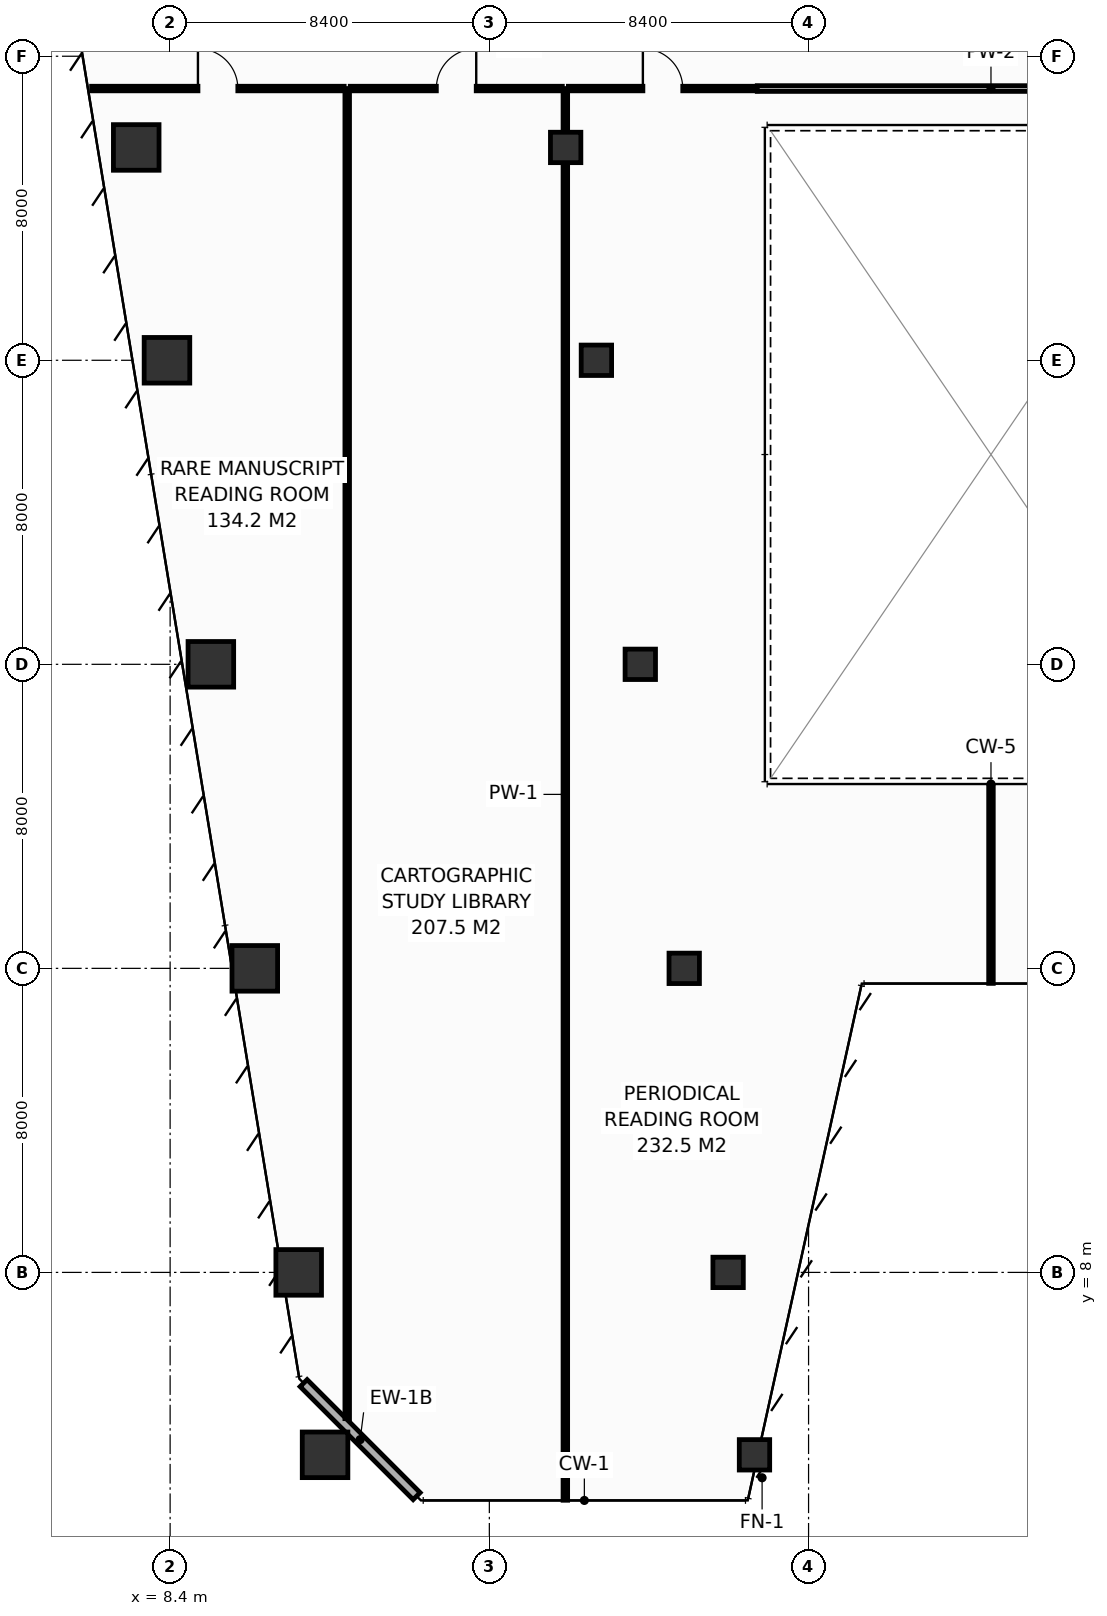
"""IFC4 building model, lengths in metres.
Left out: names, types, materials, properties, quantities, classifications, styles, units other than length and angle.
Written with IfcOpenShell. Run it as: python <this file> out.ifc"""

import sys

from ifc_helpers import new_model, si_unit, direction, frame, frame_2d, origin, origin_2d, place, context, subcontext, project, spatial, rectangle, hollow_rectangle, extrude, element, fill, save


model = new_model("IFC4")
c1 = context("Model", 3, precision=1e-05, world=origin(), true_north=direction((0.0, 1.0)))
c2 = subcontext(c1, "Body", "Model", "MODEL_VIEW")
j1 = project(units=[si_unit("LENGTHUNIT", "METRE"), si_unit("PLANEANGLEUNIT", "RADIAN")], contexts=[c1])
p1 = place(None, origin())
s1 = spatial("IfcSite", under=j1, at=p1, CompositionType="ELEMENT")
p2 = place(p1, origin())
s2 = spatial("IfcBuilding", under=s1, at=p2, CompositionType="ELEMENT")
p3 = place(p2, frame((0.0, 0.0, 47.2)))
s3 = spatial("IfcBuildingStorey", under=s2, at=p3, CompositionType="ELEMENT", Elevation=47.2)
p4 = place(p3, frame((12.477, 3.2, 0.0), z_axis=(0.0, 0.0, 1.0), x_axis=(1.0, 0.0, 0.0)))
e1 = element("IfcColumn", 1, at=p4, inside=s3, PredefinedType="COLUMN", context=c2, shape_type="SweptSolid", body=[
    extrude(hollow_rectangle(XDim=1.2, YDim=1.2, WallThickness=0.055, at=origin_2d()), origin(), (0.0, 0.0, 1.0), 4.4),
])
p5 = place(p3, frame((23.777, 3.2, 0.0), z_axis=(0.0, 0.0, 1.0), x_axis=(1.0, 0.0, 0.0)))
e2 = element("IfcColumn", 2, at=p5, inside=s3, PredefinedType="COLUMN", context=c2, shape_type="SweptSolid", body=[
    extrude(hollow_rectangle(XDim=0.8, YDim=0.8, WallThickness=0.036, at=origin_2d()), origin(), (0.0, 0.0, 1.0), 4.4),
])
p6 = place(p3, frame((11.783, 8.0, 0.0), z_axis=(0.0, 0.0, 1.0), x_axis=(1.0, 0.0, 0.0)))
e3 = element("IfcColumn", 3, at=p6, inside=s3, PredefinedType="COLUMN", context=c2, shape_type="SweptSolid", body=[
    extrude(hollow_rectangle(XDim=1.2, YDim=1.2, WallThickness=0.055, at=origin_2d()), origin(), (0.0, 0.0, 1.0), 4.4),
])
p7 = place(p3, frame((23.083, 8.0, 0.0), z_axis=(0.0, 0.0, 1.0), x_axis=(1.0, 0.0, 0.0)))
e4 = element("IfcColumn", 4, at=p7, inside=s3, PredefinedType="COLUMN", context=c2, shape_type="SweptSolid", body=[
    extrude(hollow_rectangle(XDim=0.8, YDim=0.8, WallThickness=0.036, at=origin_2d()), origin(), (0.0, 0.0, 1.0), 4.4),
])
p8 = place(p3, frame((10.628, 16.0, 0.0), z_axis=(0.0, 0.0, 1.0), x_axis=(1.0, 0.0, 0.0)))
e5 = element("IfcColumn", 5, at=p8, inside=s3, PredefinedType="COLUMN", context=c2, shape_type="SweptSolid", body=[
    extrude(hollow_rectangle(XDim=1.2, YDim=1.2, WallThickness=0.055, at=origin_2d()), origin(), (0.0, 0.0, 1.0), 4.4),
])
p9 = place(p3, frame((21.928, 16.0, 0.0), z_axis=(0.0, 0.0, 1.0), x_axis=(1.0, 0.0, 0.0)))
e6 = element("IfcColumn", 6, at=p9, inside=s3, PredefinedType="COLUMN", context=c2, shape_type="SweptSolid", body=[
    extrude(hollow_rectangle(XDim=0.8, YDim=0.8, WallThickness=0.036, at=origin_2d()), origin(), (0.0, 0.0, 1.0), 4.4),
])
p10 = place(p3, frame((9.472, 24.0, 0.0), z_axis=(0.0, 0.0, 1.0), x_axis=(1.0, 0.0, 0.0)))
e7 = element("IfcColumn", 7, at=p10, inside=s3, PredefinedType="COLUMN", context=c2, shape_type="SweptSolid", body=[
    extrude(hollow_rectangle(XDim=1.2, YDim=1.2, WallThickness=0.055, at=origin_2d()), origin(), (0.0, 0.0, 1.0), 4.4),
])
p11 = place(p3, frame((20.772, 24.0, 0.0), z_axis=(0.0, 0.0, 1.0), x_axis=(1.0, 0.0, 0.0)))
e8 = element("IfcColumn", 8, at=p11, inside=s3, PredefinedType="COLUMN", context=c2, shape_type="SweptSolid", body=[
    extrude(hollow_rectangle(XDim=0.8, YDim=0.8, WallThickness=0.036, at=origin_2d()), origin(), (0.0, 0.0, 1.0), 4.4),
])
p12 = place(p3, frame((8.317, 32.0, 0.0), z_axis=(0.0, 0.0, 1.0), x_axis=(1.0, 0.0, 0.0)))
e9 = element("IfcColumn", 9, at=p12, inside=s3, PredefinedType="COLUMN", context=c2, shape_type="SweptSolid", body=[
    extrude(hollow_rectangle(XDim=1.2, YDim=1.2, WallThickness=0.055, at=origin_2d()), origin(), (0.0, 0.0, 1.0), 4.4),
])
p13 = place(p3, frame((19.617, 32.0, 0.0), z_axis=(0.0, 0.0, 1.0), x_axis=(1.0, 0.0, 0.0)))
e10 = element("IfcColumn", 10, at=p13, inside=s3, PredefinedType="COLUMN", context=c2, shape_type="SweptSolid", body=[
    extrude(hollow_rectangle(XDim=0.8, YDim=0.8, WallThickness=0.036, at=origin_2d()), origin(), (0.0, 0.0, 1.0), 4.4),
])
p14 = place(p3, frame((7.508, 37.6, 0.0), z_axis=(0.0, 0.0, 1.0), x_axis=(1.0, 0.0, 0.0)))
e11 = element("IfcColumn", 11, at=p14, inside=s3, PredefinedType="COLUMN", context=c2, shape_type="SweptSolid", body=[
    extrude(hollow_rectangle(XDim=1.2, YDim=1.2, WallThickness=0.055, at=origin_2d()), origin(), (0.0, 0.0, 1.0), 4.4),
])
p15 = place(p3, frame((18.808, 37.6, 0.0), z_axis=(0.0, 0.0, 1.0), x_axis=(1.0, 0.0, 0.0)))
e12 = element("IfcColumn", 12, at=p15, inside=s3, PredefinedType="COLUMN", context=c2, shape_type="SweptSolid", body=[
    extrude(hollow_rectangle(XDim=0.8, YDim=0.8, WallThickness=0.036, at=origin_2d()), origin(), (0.0, 0.0, 1.0), 4.4),
])
p16 = place(p3, frame((11.913, 5.087, 0.0), z_axis=(0.0, 0.0, 1.0), x_axis=(0.707106781187, -0.707106781187, 0.0)))
e13 = element("IfcWall", 13, at=p16, inside=s3, PredefinedType="STANDARD", context=c2, shape_type="SweptSolid", body=[
    extrude(rectangle(XDim=4.206, YDim=0.26, at=frame_2d((2.103, 0.0))), origin(), (0.0, 0.0, 1.0), 4.15),
])
p17 = place(p3, frame((13.06, 4.152, 0.0), z_axis=(0.0, 0.0, 1.0), x_axis=(0.0, 1.0, 0.0)))
e14 = element("IfcWall", 14, at=p17, inside=s3, PredefinedType="PARTITIONING", context=c2, shape_type="SweptSolid", body=[
    extrude(rectangle(XDim=34.998, YDim=0.12, at=frame_2d((17.499, 0.0))), origin(), (0.0, 0.0, 1.0), 3.335),
])
p18 = place(p3, frame((18.8, 2.005, 0.0), z_axis=(0.0, 0.0, 1.0), x_axis=(0.0, 1.0, 0.0)))
e15 = element("IfcWall", 15, at=p18, inside=s3, PredefinedType="PARTITIONING", context=c2, shape_type="SweptSolid", body=[
    extrude(rectangle(XDim=37.145, YDim=0.12, at=frame_2d((18.573, 0.0))), origin(), (0.0, 0.0, 1.0), 3.335),
])
p19 = place(p3, frame((30.0, 15.605, 0.0), z_axis=(0.0, 0.0, 1.0), x_axis=(0.0, 1.0, 0.0)))
e16 = element("IfcWall", 16, at=p19, inside=s3, PredefinedType="PARTITIONING", context=c2, shape_type="SweptSolid", body=[
    extrude(rectangle(XDim=5.175, YDim=0.12, at=frame_2d((2.587, 0.0))), origin(), (0.0, 0.0, 1.0), 4.15),
])
p20 = place(p3, frame((6.334, 39.15, 0.0), z_axis=(0.0, 0.0, 1.0), x_axis=(1.0, 0.0, 0.0)))
e17 = element("IfcWall", 17, at=p20, inside=s3, PredefinedType="PARTITIONING", context=c2, shape_type="SweptSolid", body=[
    extrude(rectangle(XDim=6.646, YDim=0.12, at=frame_2d((3.323, 0.0))), origin(), (0.0, 0.0, 1.0), 3.635),
])
p21 = place(p20, frame((2.798, 0.0, 0.0)))
e18 = element("IfcOpeningElement", 18, at=p21, cuts=e17, PredefinedType="OPENING", context=c2, shape_type="SweptSolid", body=[
    extrude(rectangle(XDim=1.05, YDim=2.15, at=frame_2d((0.525, 1.075))), frame((0.0, 0.07, 0.0), z_axis=(0.0, -1.0, 0.0), x_axis=(1.0, 0.0, 0.0)), (0.0, 0.0, 1.0), 0.14),
])
p22 = place(p3, frame((13.14, 39.15, 0.0), z_axis=(0.0, 0.0, 1.0), x_axis=(1.0, 0.0, 0.0)))
e19 = element("IfcWall", 19, at=p22, inside=s3, PredefinedType="PARTITIONING", context=c2, shape_type="SweptSolid", body=[
    extrude(rectangle(XDim=5.58, YDim=0.12, at=frame_2d((2.79, 0.0))), origin(), (0.0, 0.0, 1.0), 4.15),
])
p23 = place(p22, frame((2.265, 0.0, 0.0)))
e20 = element("IfcOpeningElement", 20, at=p23, cuts=e19, PredefinedType="OPENING", context=c2, shape_type="SweptSolid", body=[
    extrude(rectangle(XDim=1.05, YDim=2.15, at=frame_2d((0.525, 1.075))), frame((0.0, 0.07, 0.0), z_axis=(0.0, -1.0, 0.0), x_axis=(1.0, 0.0, 0.0)), (0.0, 0.0, 1.0), 0.14),
])
p24 = place(p3, frame((18.88, 39.15, 0.0), z_axis=(0.0, 0.0, 1.0), x_axis=(1.0, 0.0, 0.0)))
e21 = element("IfcWall", 21, at=p24, inside=s3, PredefinedType="PARTITIONING", context=c2, shape_type="SweptSolid", body=[
    extrude(rectangle(XDim=4.97, YDim=0.12, at=frame_2d((2.485, 0.0))), origin(), (0.0, 0.0, 1.0), 3.335),
])
p25 = place(p24, frame((1.96, 0.0, 0.0)))
e22 = element("IfcOpeningElement", 22, at=p25, cuts=e21, PredefinedType="OPENING", context=c2, shape_type="SweptSolid", body=[
    extrude(rectangle(XDim=1.05, YDim=2.15, at=frame_2d((0.525, 1.075))), frame((0.0, 0.07, 0.0), z_axis=(0.0, -1.0, 0.0), x_axis=(1.0, 0.0, 0.0)), (0.0, 0.0, 1.0), 0.14),
])
p26 = place(p3, frame((23.85, 39.15, 0.0), z_axis=(0.0, 0.0, 1.0), x_axis=(1.0, 0.0, 0.0)))
e23 = element("IfcWall", 23, at=p26, inside=s3, PredefinedType="PARTITIONING", context=c2, shape_type="SweptSolid", body=[
    extrude(rectangle(XDim=12.3, YDim=0.15, at=frame_2d((6.15, 0.0))), origin(), (0.0, 0.0, 1.0), 4.15),
])
p27 = place(p21, origin())
e24 = element("IfcDoor", 24, at=p27, inside=s3, OperationType="SINGLE_SWING_LEFT", PredefinedType="DOOR", context=c2, shape_type="SweptSolid", body=[
    extrude(rectangle(XDim=1.05, YDim=2.15, at=frame_2d((0.525, 1.075))), frame((0.0, 0.025, 0.0), z_axis=(0.0, -1.0, 0.0), x_axis=(1.0, 0.0, 0.0)), (0.0, 0.0, 1.0), 0.05),
])
fill(e18, e24)
p28 = place(p23, origin())
e25 = element("IfcDoor", 25, at=p28, inside=s3, OperationType="SINGLE_SWING_RIGHT", PredefinedType="DOOR", context=c2, shape_type="SweptSolid", body=[
    extrude(rectangle(XDim=1.05, YDim=2.15, at=frame_2d((0.525, 1.075))), frame((0.0, 0.025, 0.0), z_axis=(0.0, -1.0, 0.0), x_axis=(1.0, 0.0, 0.0)), (0.0, 0.0, 1.0), 0.05),
])
fill(e20, e25)
p29 = place(p25, origin())
e26 = element("IfcDoor", 26, at=p29, inside=s3, OperationType="SINGLE_SWING_LEFT", PredefinedType="DOOR", context=c2, shape_type="SweptSolid", body=[
    extrude(rectangle(XDim=1.05, YDim=2.15, at=frame_2d((0.525, 1.075))), frame((0.0, 0.025, 0.0), z_axis=(0.0, -1.0, 0.0), x_axis=(1.0, 0.0, 0.0)), (0.0, 0.0, 1.0), 0.05),
])
fill(e22, e26)
save(model, sys.argv[1])
